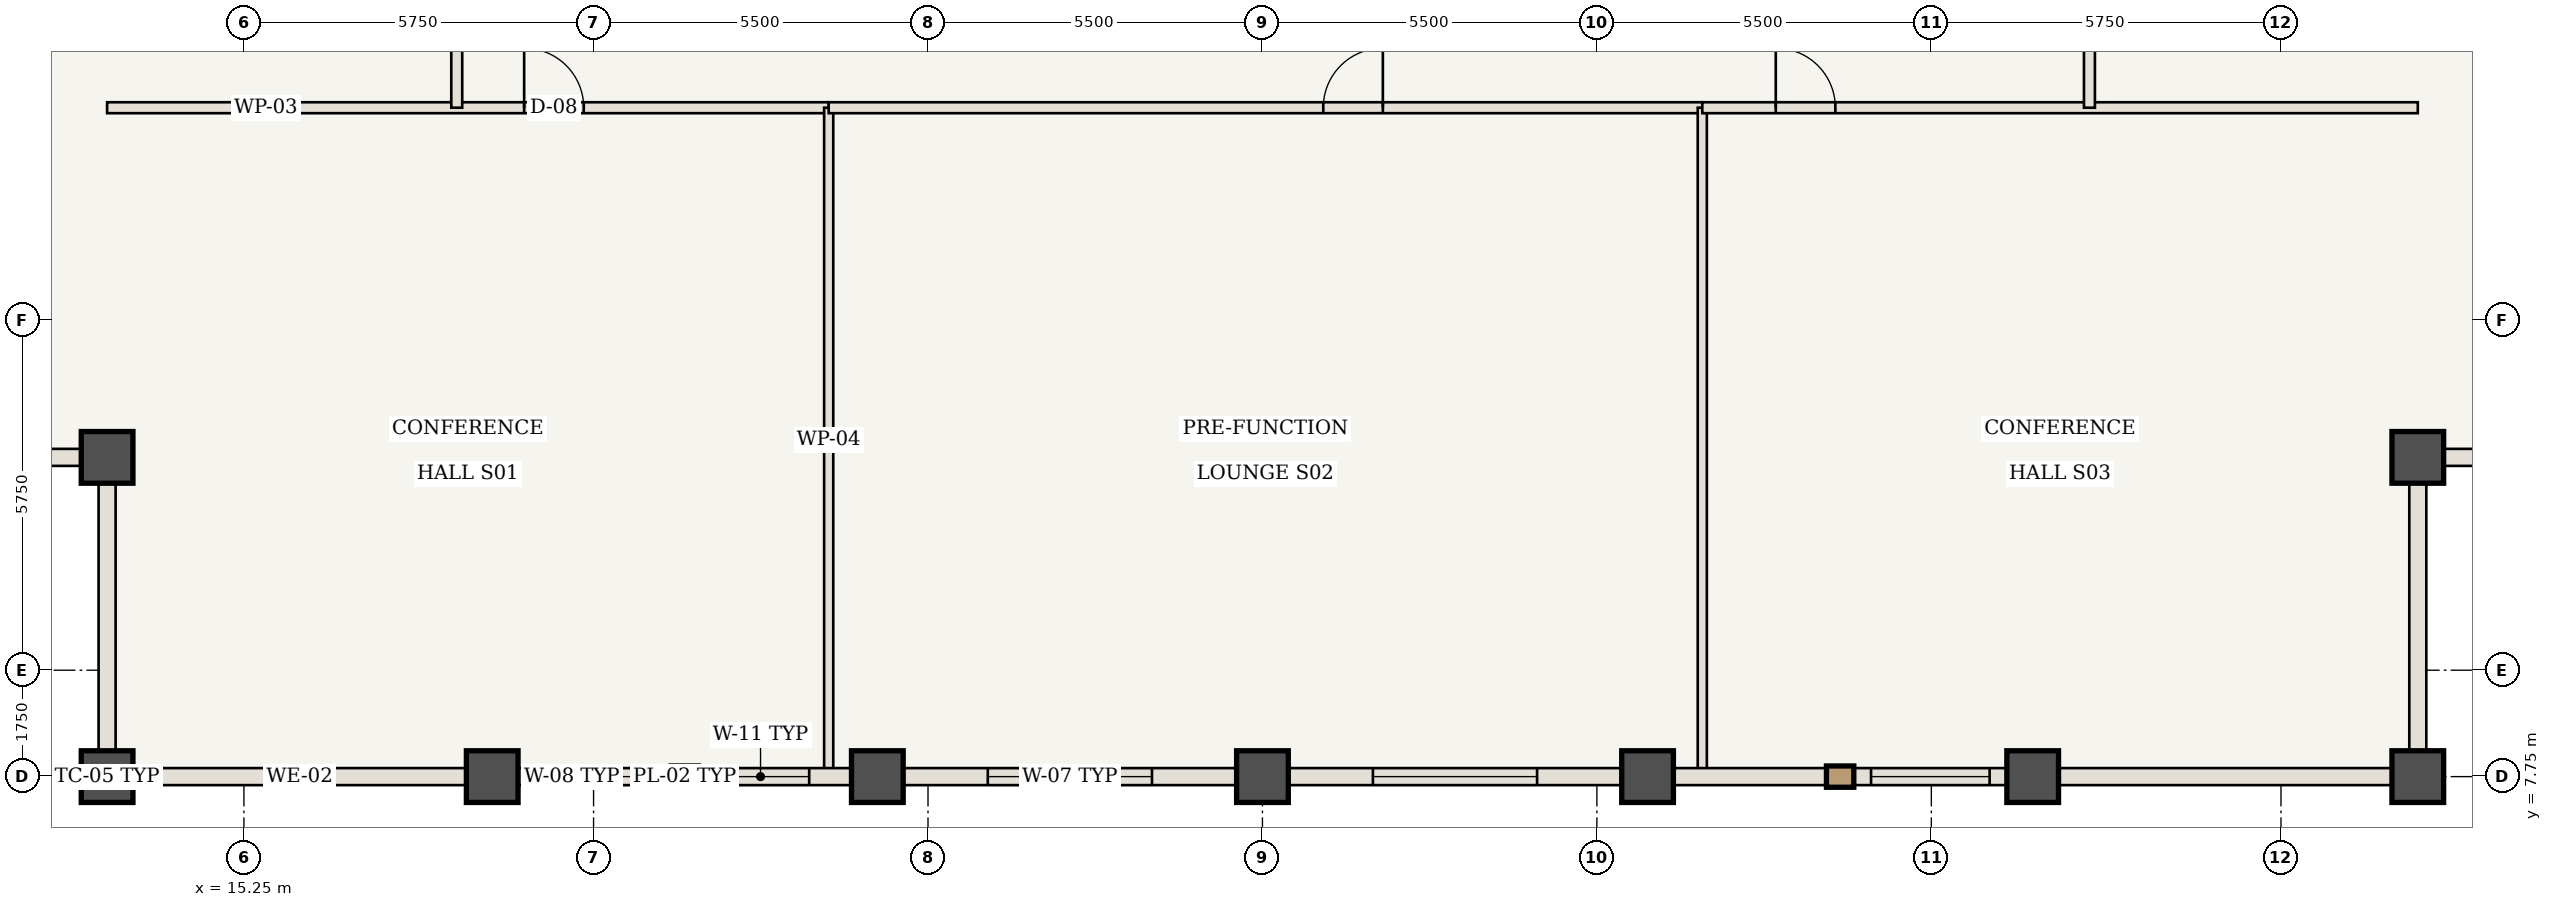
"""IFC4 building model, lengths in metres.
Left out: names, types, materials, properties, quantities, classifications, styles, units other than length and angle.
Written with IfcOpenShell. Run it as: python <this file> out.ifc"""

import sys

from ifc_helpers import new_model, si_unit, direction, frame, frame_2d, origin, origin_2d, place, context, subcontext, project, spatial, rectangle, extrude, element, fill, save


model = new_model("IFC4")
c1 = context("Model", 3, precision=1e-05, world=origin(), true_north=direction((0.0, 1.0)))
c2 = subcontext(c1, "Body", "Model", "MODEL_VIEW")
j1 = project(units=[si_unit("LENGTHUNIT", "METRE"), si_unit("PLANEANGLEUNIT", "RADIAN")], contexts=[c1])
p1 = place(None, origin())
s1 = spatial("IfcSite", under=j1, at=p1, CompositionType="ELEMENT")
p2 = place(p1, origin())
s2 = spatial("IfcBuilding", under=s1, at=p2, CompositionType="ELEMENT")
p3 = place(p2, frame((0.0, 0.0, 236.95)))
s3 = spatial("IfcBuildingStorey", under=s2, at=p3, CompositionType="ELEMENT", Elevation=236.95)
for number, where, z_axis, x_axis in (
    (1, (13.0, 7.75, 0.0), (0.0, 0.0, 1.0), (1.0, 0.0, 0.0)),
    (2, (13.0, 13.0, 0.0), (0.0, 0.0, 1.0), (1.0, 0.0, 0.0)),
    (3, (51.0, 7.75, 0.0), (0.0, 0.0, 1.0), (1.0, 0.0, 0.0)),
    (4, (51.0, 13.0, 0.0), (0.0, 0.0, 1.0), (1.0, 0.0, 0.0)),
    (5, (19.333, 7.75, 0.0), (0.0, 0.0, 1.0), (1.0, 0.0, 0.0)),
    (6, (25.667, 7.75, 0.0), (0.0, 0.0, 1.0), (1.0, 0.0, 0.0)),
    (7, (32.0, 7.75, 0.0), (0.0, 0.0, 1.0), (1.0, 0.0, 0.0)),
    (8, (38.333, 7.75, 0.0), (0.0, 0.0, 1.0), (1.0, 0.0, 0.0)),
    (9, (44.667, 7.75, 0.0), (0.0, 0.0, 1.0), (1.0, 0.0, 0.0)),
):
    element("IfcColumn", number, at=place(p3, frame(where, z_axis=z_axis, x_axis=x_axis)), inside=s3, PredefinedType="COLUMN", context=c2, shape_type="SweptSolid", body=[
        extrude(rectangle(XDim=0.85, YDim=0.85, at=origin_2d()), origin(), (0.0, 0.0, 1.0), 3.85),
    ])
p4 = place(p3, frame((13.0, 18.75, 0.0), z_axis=(0.0, 0.0, 1.0), x_axis=(1.0, 0.0, 0.0)))
e10 = element("IfcWall", 10, at=p4, inside=s3, PredefinedType="STANDARD", context=c2, shape_type="SweptSolid", body=[
    extrude(rectangle(XDim=11.867, YDim=0.18, at=frame_2d((5.933, 0.0))), origin(), (0.0, 0.0, 1.0), 3.685),
])
p5 = place(p4, frame((6.858, 0.0, 0.0)))
e11 = element("IfcOpeningElement", 11, at=p5, cuts=e10, PredefinedType="OPENING", context=c2, shape_type="SweptSolid", body=[
    extrude(rectangle(XDim=0.98, YDim=2.2, at=frame_2d((0.49, 1.1))), frame((0.0, 0.1, 0.0), z_axis=(0.0, -1.0, 0.0), x_axis=(1.0, 0.0, 0.0)), (0.0, 0.0, 1.0), 0.2),
])
p6 = place(p3, frame((24.867, 7.81, 0.0), z_axis=(0.0, 0.0, 1.0), x_axis=(0.0, 1.0, 0.0)))
e12 = element("IfcWall", 12, at=p6, inside=s3, PredefinedType="STANDARD", context=c2, shape_type="SweptSolid", body=[
    extrude(rectangle(XDim=10.94, YDim=0.15, at=frame_2d((5.47, 0.0))), origin(), (0.0, 0.0, 1.0), 3.685),
])
p7 = place(p3, frame((24.867, 18.75, 0.0), z_axis=(0.0, 0.0, 1.0), x_axis=(1.0, 0.0, 0.0)))
e13 = element("IfcWall", 13, at=p7, inside=s3, PredefinedType="STANDARD", context=c2, shape_type="SweptSolid", body=[
    extrude(rectangle(XDim=14.367, YDim=0.18, at=frame_2d((7.183, 0.0))), origin(), (0.0, 0.0, 1.0), 3.685),
])
p8 = place(p7, frame((8.133, 0.0, 0.0)))
e14 = element("IfcOpeningElement", 14, at=p8, cuts=e13, PredefinedType="OPENING", context=c2, shape_type="SweptSolid", body=[
    extrude(rectangle(XDim=0.98, YDim=2.2, at=frame_2d((0.49, 1.1))), frame((0.0, 0.1, 0.0), z_axis=(0.0, -1.0, 0.0), x_axis=(1.0, 0.0, 0.0)), (0.0, 0.0, 1.0), 0.2),
])
p9 = place(p3, frame((39.233, 7.81, 0.0), z_axis=(0.0, 0.0, 1.0), x_axis=(0.0, 1.0, 0.0)))
e15 = element("IfcWall", 15, at=p9, inside=s3, PredefinedType="STANDARD", context=c2, shape_type="SweptSolid", body=[
    extrude(rectangle(XDim=10.94, YDim=0.15, at=frame_2d((5.47, 0.0))), origin(), (0.0, 0.0, 1.0), 3.685),
])
p10 = place(p3, frame((39.233, 18.75, 0.0), z_axis=(0.0, 0.0, 1.0), x_axis=(1.0, 0.0, 0.0)))
e16 = element("IfcWall", 16, at=p10, inside=s3, PredefinedType="STANDARD", context=c2, shape_type="SweptSolid", body=[
    extrude(rectangle(XDim=11.767, YDim=0.18, at=frame_2d((5.883, 0.0))), origin(), (0.0, 0.0, 1.0), 3.685),
])
p11 = place(p10, frame((1.208, 0.0, 0.0)))
e17 = element("IfcOpeningElement", 17, at=p11, cuts=e16, PredefinedType="OPENING", context=c2, shape_type="SweptSolid", body=[
    extrude(rectangle(XDim=0.98, YDim=2.2, at=frame_2d((0.49, 1.1))), frame((0.0, 0.1, 0.0), z_axis=(0.0, -1.0, 0.0), x_axis=(1.0, 0.0, 0.0)), (0.0, 0.0, 1.0), 0.2),
])
p12 = place(p3, frame((18.75, 18.75, 0.0), z_axis=(0.0, 0.0, 1.0), x_axis=(0.0, 1.0, 0.0)))
e18 = element("IfcWall", 18, at=p12, inside=s3, PredefinedType="STANDARD", context=c2, shape_type="SweptSolid", body=[
    extrude(rectangle(XDim=26.5, YDim=0.18, at=frame_2d((13.25, 0.0))), origin(), (0.0, 0.0, 1.0), 3.685),
])
p13 = place(p12, frame((14.2, 0.0, 0.0)))
e19 = element("IfcOpeningElement", 19, at=p13, cuts=e18, PredefinedType="OPENING", context=c2, shape_type="SweptSolid", body=[
    extrude(rectangle(XDim=0.98, YDim=2.2, at=frame_2d((0.49, 1.1))), frame((0.0, 0.1, 0.0), z_axis=(0.0, -1.0, 0.0), x_axis=(1.0, 0.0, 0.0)), (0.0, 0.0, 1.0), 0.2),
])
p14 = place(p3, frame((45.6, 18.75, 0.0), z_axis=(0.0, 0.0, 1.0), x_axis=(0.0, 1.0, 0.0)))
e20 = element("IfcWall", 20, at=p14, inside=s3, PredefinedType="STANDARD", context=c2, shape_type="SweptSolid", body=[
    extrude(rectangle(XDim=13.95, YDim=0.18, at=frame_2d((6.975, 0.0))), origin(), (0.0, 0.0, 1.0), 3.685),
])
p15 = place(p14, frame((6.475, 0.0, 0.0)))
e21 = element("IfcOpeningElement", 21, at=p15, cuts=e20, PredefinedType="OPENING", context=c2, shape_type="SweptSolid", body=[
    extrude(rectangle(XDim=0.98, YDim=2.2, at=frame_2d((0.49, 1.1))), frame((0.0, 0.1, 0.0), z_axis=(0.0, -1.0, 0.0), x_axis=(1.0, 0.0, 0.0)), (0.0, 0.0, 1.0), 0.2),
])
p16 = place(p3, frame((19.333, 7.75, 0.0), z_axis=(0.0, 0.0, 1.0), x_axis=(-1.0, 0.0, 0.0)))
e22 = element("IfcWall", 22, at=p16, inside=s3, PredefinedType="USERDEFINED", context=c2, shape_type="SweptSolid", body=[
    extrude(rectangle(XDim=6.333, YDim=0.28, at=frame_2d((3.167, 0.0))), origin(), (0.0, 0.0, 1.0), 2.985),
])
p17 = place(p3, frame((25.667, 7.75, 0.0), z_axis=(0.0, 0.0, 1.0), x_axis=(-1.0, 0.0, 0.0)))
e23 = element("IfcWall", 23, at=p17, inside=s3, PredefinedType="USERDEFINED", context=c2, shape_type="SweptSolid", body=[
    extrude(rectangle(XDim=6.333, YDim=0.28, at=frame_2d((3.167, 0.0))), origin(), (0.0, 0.0, 1.0), 2.985),
])
p18 = place(p17, frame((1.121, 0.0, 0.85)))
e24 = element("IfcOpeningElement", 24, at=p18, cuts=e23, PredefinedType="OPENING", context=c2, shape_type="SweptSolid", body=[
    extrude(rectangle(XDim=1.6, YDim=1.935, at=frame_2d((0.8, 0.968))), frame((0.0, 0.15, 0.0), z_axis=(0.0, -1.0, 0.0), x_axis=(1.0, 0.0, 0.0)), (0.0, 0.0, 1.0), 0.3),
])
p19 = place(p17, frame((3.675, 0.0, 0.85)))
e25 = element("IfcOpeningElement", 25, at=p19, cuts=e23, PredefinedType="OPENING", context=c2, shape_type="SweptSolid", body=[
    extrude(rectangle(XDim=1.95, YDim=1.935, at=frame_2d((0.975, 0.968))), frame((0.0, 0.15, 0.0), z_axis=(0.0, -1.0, 0.0), x_axis=(1.0, 0.0, 0.0)), (0.0, 0.0, 1.0), 0.3),
])
p20 = place(p3, frame((32.0, 7.75, 0.0), z_axis=(0.0, 0.0, 1.0), x_axis=(-1.0, 0.0, 0.0)))
e26 = element("IfcWall", 26, at=p20, inside=s3, PredefinedType="USERDEFINED", context=c2, shape_type="SweptSolid", body=[
    extrude(rectangle(XDim=6.333, YDim=0.28, at=frame_2d((3.167, 0.0))), origin(), (0.0, 0.0, 1.0), 2.985),
])
p21 = place(p20, frame((1.817, 0.0, 0.85)))
e27 = element("IfcOpeningElement", 27, at=p21, cuts=e26, PredefinedType="OPENING", context=c2, shape_type="SweptSolid", body=[
    extrude(rectangle(XDim=2.7, YDim=1.935, at=frame_2d((1.35, 0.968))), frame((0.0, 0.15, 0.0), z_axis=(0.0, -1.0, 0.0), x_axis=(1.0, 0.0, 0.0)), (0.0, 0.0, 1.0), 0.3),
])
p22 = place(p3, frame((38.333, 7.75, 0.0), z_axis=(0.0, 0.0, 1.0), x_axis=(-1.0, 0.0, 0.0)))
e28 = element("IfcWall", 28, at=p22, inside=s3, PredefinedType="USERDEFINED", context=c2, shape_type="SweptSolid", body=[
    extrude(rectangle(XDim=6.333, YDim=0.28, at=frame_2d((3.167, 0.0))), origin(), (0.0, 0.0, 1.0), 2.985),
])
p23 = place(p22, frame((1.817, 0.0, 0.85)))
e29 = element("IfcOpeningElement", 29, at=p23, cuts=e28, PredefinedType="OPENING", context=c2, shape_type="SweptSolid", body=[
    extrude(rectangle(XDim=2.7, YDim=1.935, at=frame_2d((1.35, 0.968))), frame((0.0, 0.15, 0.0), z_axis=(0.0, -1.0, 0.0), x_axis=(1.0, 0.0, 0.0)), (0.0, 0.0, 1.0), 0.3),
])
p24 = place(p3, frame((44.667, 7.75, 0.0), z_axis=(0.0, 0.0, 1.0), x_axis=(-1.0, 0.0, 0.0)))
e30 = element("IfcWall", 30, at=p24, inside=s3, PredefinedType="USERDEFINED", context=c2, shape_type="SweptSolid", body=[
    extrude(rectangle(XDim=6.333, YDim=0.28, at=frame_2d((3.167, 0.0))), origin(), (0.0, 0.0, 1.0), 2.985),
])
p25 = place(p24, frame((0.708, 0.0, 0.85)))
e31 = element("IfcOpeningElement", 31, at=p25, cuts=e30, PredefinedType="OPENING", context=c2, shape_type="SweptSolid", body=[
    extrude(rectangle(XDim=1.95, YDim=1.935, at=frame_2d((0.975, 0.968))), frame((0.0, 0.15, 0.0), z_axis=(0.0, -1.0, 0.0), x_axis=(1.0, 0.0, 0.0)), (0.0, 0.0, 1.0), 0.3),
])
p26 = place(p3, frame((51.0, 7.75, 0.0), z_axis=(0.0, 0.0, 1.0), x_axis=(-1.0, 0.0, 0.0)))
e32 = element("IfcWall", 32, at=p26, inside=s3, PredefinedType="USERDEFINED", context=c2, shape_type="SweptSolid", body=[
    extrude(rectangle(XDim=6.333, YDim=0.28, at=frame_2d((3.167, 0.0))), origin(), (0.0, 0.0, 1.0), 2.985),
])
for number, where, z_axis, x_axis in (
    (33, (13.0, 7.75, 0.0), (0.0, 0.0, 1.0), (0.0, 1.0, 0.0)),
    (34, (13.0, 13.0, 0.0), (0.0, 0.0, 1.0), (-1.0, 0.0, 0.0)),
    (35, (51.0, 13.0, 0.0), (0.0, 0.0, 1.0), (0.0, -1.0, 0.0)),
    (36, (56.25, 13.0, 0.0), (0.0, 0.0, 1.0), (-1.0, 0.0, 0.0)),
):
    element("IfcWall", number, at=place(p3, frame(where, z_axis=z_axis, x_axis=x_axis)), inside=s3, PredefinedType="USERDEFINED", context=c2, shape_type="SweptSolid", body=[
        extrude(rectangle(XDim=5.25, YDim=0.28, at=frame_2d((2.625, 0.0))), origin(), (0.0, 0.0, 1.0), 2.985),
    ])
p27 = place(p5, origin())
e37 = element("IfcDoor", 37, at=p27, inside=s3, OperationType="SINGLE_SWING_LEFT", PredefinedType="DOOR", context=c2, shape_type="SweptSolid", body=[
    extrude(rectangle(XDim=0.98, YDim=2.2, at=frame_2d((0.49, 1.1))), frame((0.0, 0.025, 0.0), z_axis=(0.0, -1.0, 0.0), x_axis=(1.0, 0.0, 0.0)), (0.0, 0.0, 1.0), 0.05),
])
fill(e11, e37)
p28 = place(p8, origin())
e38 = element("IfcDoor", 38, at=p28, inside=s3, OperationType="SINGLE_SWING_RIGHT", PredefinedType="DOOR", context=c2, shape_type="SweptSolid", body=[
    extrude(rectangle(XDim=0.98, YDim=2.2, at=frame_2d((0.49, 1.1))), frame((0.0, 0.025, 0.0), z_axis=(0.0, -1.0, 0.0), x_axis=(1.0, 0.0, 0.0)), (0.0, 0.0, 1.0), 0.05),
])
fill(e14, e38)
p29 = place(p11, origin())
e39 = element("IfcDoor", 39, at=p29, inside=s3, OperationType="SINGLE_SWING_LEFT", PredefinedType="DOOR", context=c2, shape_type="SweptSolid", body=[
    extrude(rectangle(XDim=0.98, YDim=2.2, at=frame_2d((0.49, 1.1))), frame((0.0, 0.025, 0.0), z_axis=(0.0, -1.0, 0.0), x_axis=(1.0, 0.0, 0.0)), (0.0, 0.0, 1.0), 0.05),
])
fill(e17, e39)
p30 = place(p18, origin())
e40 = element("IfcWindow", 40, at=p30, inside=s3, PartitioningType="SINGLE_PANEL", PredefinedType="WINDOW", context=c2, shape_type="SweptSolid", body=[
    extrude(rectangle(XDim=1.6, YDim=1.935, at=frame_2d((0.8, 0.968))), frame((0.0, 0.03, 0.0), z_axis=(0.0, -1.0, 0.0), x_axis=(1.0, 0.0, 0.0)), (0.0, 0.0, 1.0), 0.06),
])
fill(e24, e40)
p31 = place(p19, origin())
e41 = element("IfcWindow", 41, at=p31, inside=s3, PartitioningType="SINGLE_PANEL", PredefinedType="WINDOW", context=c2, shape_type="SweptSolid", body=[
    extrude(rectangle(XDim=1.95, YDim=1.935, at=frame_2d((0.975, 0.968))), frame((0.0, 0.03, 0.0), z_axis=(0.0, -1.0, 0.0), x_axis=(1.0, 0.0, 0.0)), (0.0, 0.0, 1.0), 0.06),
])
fill(e25, e41)
p32 = place(p21, origin())
e42 = element("IfcWindow", 42, at=p32, inside=s3, PartitioningType="SINGLE_PANEL", PredefinedType="WINDOW", context=c2, shape_type="SweptSolid", body=[
    extrude(rectangle(XDim=2.7, YDim=1.935, at=frame_2d((1.35, 0.968))), frame((0.0, 0.03, 0.0), z_axis=(0.0, -1.0, 0.0), x_axis=(1.0, 0.0, 0.0)), (0.0, 0.0, 1.0), 0.06),
])
fill(e27, e42)
p33 = place(p23, origin())
e43 = element("IfcWindow", 43, at=p33, inside=s3, PartitioningType="SINGLE_PANEL", PredefinedType="WINDOW", context=c2, shape_type="SweptSolid", body=[
    extrude(rectangle(XDim=2.7, YDim=1.935, at=frame_2d((1.35, 0.968))), frame((0.0, 0.03, 0.0), z_axis=(0.0, -1.0, 0.0), x_axis=(1.0, 0.0, 0.0)), (0.0, 0.0, 1.0), 0.06),
])
fill(e29, e43)
p34 = place(p25, origin())
e44 = element("IfcWindow", 44, at=p34, inside=s3, PartitioningType="SINGLE_PANEL", PredefinedType="WINDOW", context=c2, shape_type="SweptSolid", body=[
    extrude(rectangle(XDim=1.95, YDim=1.935, at=frame_2d((0.975, 0.968))), frame((0.0, 0.03, 0.0), z_axis=(0.0, -1.0, 0.0), x_axis=(1.0, 0.0, 0.0)), (0.0, 0.0, 1.0), 0.06),
])
fill(e31, e44)
save(model, sys.argv[1])
